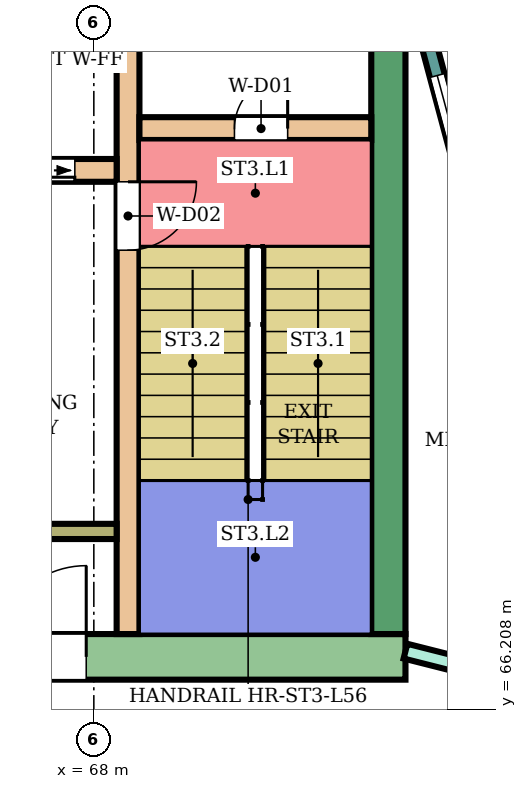
"""IFC4 building model, lengths in metres.
Left out: names, types, materials, properties, quantities, classifications, styles, units other than length and angle.
Written with IfcOpenShell. Run it as: python <this file> out.ifc"""

import sys

from ifc_helpers import new_model, si_unit, direction, frame, frame_2d, origin, place, context, subcontext, project, spatial, rectangle, extrude, element, fill, save


model = new_model("IFC4")
c1 = context("Model", 3, precision=1e-05, world=origin(), true_north=direction((0.0, 1.0)))
c2 = subcontext(c1, "Body", "Model", "MODEL_VIEW")
j1 = project(units=[si_unit("LENGTHUNIT", "METRE"), si_unit("PLANEANGLEUNIT", "RADIAN")], contexts=[c1])
p1 = place(None, origin())
s1 = spatial("IfcSite", under=j1, at=p1, CompositionType="ELEMENT")
p2 = place(p1, origin())
s2 = spatial("IfcBuilding", under=s1, at=p2, CompositionType="ELEMENT")
p3 = place(p2, frame((0.0, 0.0, 245.7)))
s3 = spatial("IfcBuildingStorey", under=s2, at=p3, CompositionType="ELEMENT", Elevation=245.7)
p4 = place(p3, frame((72.1, 66.9, 0.0), z_axis=(0.0, 0.0, 1.0), x_axis=(-1.0, 0.0, 0.0)))
e1 = element("IfcWall", 1, at=p4, inside=s3, PredefinedType="SHEAR", context=c2, shape_type="SweptSolid", body=[
    extrude(rectangle(XDim=14.9, YDim=0.6, at=frame_2d((7.45, 0.0))), origin(), (0.0, 0.0, 1.0), 3.88),
])
p5 = place(p4, frame((4.2, 0.0, 0.0)))
e2 = element("IfcOpeningElement", 2, at=p5, cuts=e1, PredefinedType="OPENING", context=c2, shape_type="SweptSolid", body=[
    extrude(rectangle(XDim=2.4, YDim=2.4, at=frame_2d((1.2, 1.2))), frame((0.0, 0.31, 0.0), z_axis=(0.0, -1.0, 0.0), x_axis=(1.0, 0.0, 0.0)), (0.0, 0.0, 1.0), 0.62),
])
p6 = place(p3, frame((71.875, 75.0, 0.0), z_axis=(0.0, 0.0, 1.0), x_axis=(0.0, -1.0, 0.0)))
e3 = element("IfcWall", 3, at=p6, inside=s3, PredefinedType="SHEAR", context=c2, shape_type="SweptSolid", body=[
    extrude(rectangle(XDim=7.8, YDim=0.45, at=frame_2d((3.9, 0.0))), origin(), (0.0, 0.0, 1.0), 3.88),
])
p7 = place(p3, frame((68.45, 75.0, 0.0), z_axis=(0.0, 0.0, 1.0), x_axis=(0.0, -1.0, 0.0)))
e4 = element("IfcWall", 4, at=p7, inside=s3, PredefinedType="SHEAR", context=c2, shape_type="SweptSolid", body=[
    extrude(rectangle(XDim=7.8, YDim=0.3, at=frame_2d((3.9, 0.0))), origin(), (0.0, 0.0, 1.0), 3.88),
])
p8 = place(p7, frame((1.85, 0.0, 0.0)))
e5 = element("IfcOpeningElement", 5, at=p8, cuts=e4, PredefinedType="OPENING", context=c2, shape_type="SweptSolid", body=[
    extrude(rectangle(XDim=0.9, YDim=2.1, at=frame_2d((0.45, 1.05))), frame((0.0, 0.16, 0.0), z_axis=(0.0, -1.0, 0.0), x_axis=(1.0, 0.0, 0.0)), (0.0, 0.0, 1.0), 0.32),
])
p9 = place(p3, frame((71.65, 73.85, 0.0), z_axis=(0.0, 0.0, 1.0), x_axis=(-1.0, 0.0, 0.0)))
e6 = element("IfcWall", 6, at=p9, inside=s3, PredefinedType="SHEAR", context=c2, shape_type="SweptSolid", body=[
    extrude(rectangle(XDim=3.05, YDim=0.3, at=frame_2d((1.525, 0.0))), origin(), (0.0, 0.0, 1.0), 3.88),
])
p10 = place(p9, frame((1.1, 0.0, 0.0)))
e7 = element("IfcOpeningElement", 7, at=p10, cuts=e6, PredefinedType="OPENING", context=c2, shape_type="SweptSolid", body=[
    extrude(rectangle(XDim=0.7, YDim=2.0, at=frame_2d((0.35, 1.0))), frame((0.0, 0.16, 0.0), z_axis=(0.0, -1.0, 0.0), x_axis=(1.0, 0.0, 0.0)), (0.0, 0.0, 1.0), 0.32),
])
p11 = place(p3, frame((68.3, 73.3, 0.0), z_axis=(0.0, 0.0, 1.0), x_axis=(-1.0, 0.0, 0.0)))
e8 = element("IfcWall", 8, at=p11, inside=s3, PredefinedType="SHEAR", context=c2, shape_type="SweptSolid", body=[
    extrude(rectangle(XDim=11.1, YDim=0.3, at=frame_2d((5.55, 0.0))), origin(), (0.0, 0.0, 1.0), 3.88),
])
p12 = place(p11, frame((0.55, 0.0, 0.0)))
e9 = element("IfcOpeningElement", 9, at=p12, cuts=e8, PredefinedType="OPENING", context=c2, shape_type="SweptSolid", body=[
    extrude(rectangle(XDim=1.1, YDim=2.1, at=frame_2d((0.55, 1.05))), frame((0.0, 0.16, 0.0), z_axis=(0.0, -1.0, 0.0), x_axis=(1.0, 0.0, 0.0)), (0.0, 0.0, 1.0), 0.32),
])
p13 = place(p11, frame((3.0, 0.0, 0.0)))
e10 = element("IfcOpeningElement", 10, at=p13, cuts=e8, PredefinedType="OPENING", context=c2, shape_type="SweptSolid", body=[
    extrude(rectangle(XDim=1.2, YDim=2.1, at=frame_2d((0.6, 1.05))), frame((0.0, 0.16, 0.0), z_axis=(0.0, -1.0, 0.0), x_axis=(1.0, 0.0, 0.0)), (0.0, 0.0, 1.0), 0.32),
])
p14 = place(p11, frame((5.5, 0.0, 0.0)))
e11 = element("IfcOpeningElement", 11, at=p14, cuts=e8, PredefinedType="OPENING", context=c2, shape_type="SweptSolid", body=[
    extrude(rectangle(XDim=1.2, YDim=2.1, at=frame_2d((0.6, 1.05))), frame((0.0, 0.16, 0.0), z_axis=(0.0, -1.0, 0.0), x_axis=(1.0, 0.0, 0.0)), (0.0, 0.0, 1.0), 0.32),
])
p15 = place(p11, frame((7.95, 0.0, 0.0)))
e12 = element("IfcOpeningElement", 12, at=p15, cuts=e8, PredefinedType="OPENING", context=c2, shape_type="SweptSolid", body=[
    extrude(rectangle(XDim=0.9, YDim=2.1, at=frame_2d((0.45, 1.05))), frame((0.0, 0.16, 0.0), z_axis=(0.0, -1.0, 0.0), x_axis=(1.0, 0.0, 0.0)), (0.0, 0.0, 1.0), 0.32),
])
p16 = place(p11, frame((9.75, 0.0, 0.0)))
e13 = element("IfcOpeningElement", 13, at=p16, cuts=e8, PredefinedType="OPENING", context=c2, shape_type="SweptSolid", body=[
    extrude(rectangle(XDim=0.9, YDim=2.1, at=frame_2d((0.45, 1.05))), frame((0.0, 0.16, 0.0), z_axis=(0.0, -1.0, 0.0), x_axis=(1.0, 0.0, 0.0)), (0.0, 0.0, 1.0), 0.32),
])
p17 = place(p3, frame((68.3, 68.55, 0.0), z_axis=(0.0, 0.0, 1.0), x_axis=(-1.0, 0.0, 0.0)))
e14 = element("IfcWall", 14, at=p17, inside=s3, PredefinedType="SHEAR", context=c2, shape_type="SweptSolid", body=[
    extrude(rectangle(XDim=4.35, YDim=0.2, at=frame_2d((2.175, 0.0))), origin(), (0.0, 0.0, 1.0), 3.88),
])
p18 = place(p3, frame((72.396, 75.0, 0.0), z_axis=(0.0, 0.0, 1.0), x_axis=(0.258789828301, -0.965933654434, 0.0)))
e15 = element("IfcWall", 15, at=p18, inside=s3, PredefinedType="NOTDEFINED", context=c2, shape_type="SweptSolid", body=[
    extrude(rectangle(XDim=3.936, YDim=0.2, at=frame_2d((1.968, 0.0))), origin(), (0.0, 0.0, 1.0), 4.2),
])
p19 = place(p18, frame((0.468, 0.0, 0.9)))
e16 = element("IfcOpeningElement", 16, at=p19, cuts=e15, PredefinedType="OPENING", context=c2, shape_type="SweptSolid", body=[
    extrude(rectangle(XDim=3.0, YDim=2.3, at=frame_2d((1.5, 1.15))), frame((0.0, 0.11, 0.0), z_axis=(0.0, -1.0, 0.0), x_axis=(1.0, 0.0, 0.0)), (0.0, 0.0, 1.0), 0.22),
])
p20 = place(p3, frame((72.1, 66.975, 0.0), z_axis=(0.0, 0.0, 1.0), x_axis=(0.969471314457, -0.245204752086, 0.0)))
e17 = element("IfcWall", 17, at=p20, inside=s3, PredefinedType="PARTITIONING", context=c2, shape_type="SweptSolid", body=[
    extrude(rectangle(XDim=2.582, YDim=0.2, at=frame_2d((1.291, 0.0))), origin(), (0.0, 0.0, 1.0), 3.75),
])
p21 = place(p20, frame((0.841, 0.0, 0.0)))
e18 = element("IfcOpeningElement", 18, at=p21, cuts=e17, PredefinedType="OPENING", context=c2, shape_type="SweptSolid", body=[
    extrude(rectangle(XDim=0.9, YDim=2.1, at=frame_2d((0.45, 1.05))), frame((0.0, 0.11, 0.0), z_axis=(0.0, -1.0, 0.0), x_axis=(1.0, 0.0, 0.0)), (0.0, 0.0, 1.0), 0.22),
])
p22 = place(p19, origin())
e19 = element("IfcWindow", 19, at=p22, inside=s3, PartitioningType="SINGLE_PANEL", PredefinedType="WINDOW", context=c2, shape_type="SweptSolid", body=[
    extrude(rectangle(XDim=3.0, YDim=2.3, at=frame_2d((1.5, 1.15))), frame((0.0, 0.03, 0.0), z_axis=(0.0, -1.0, 0.0), x_axis=(1.0, 0.0, 0.0)), (0.0, 0.0, 1.0), 0.06),
])
fill(e16, e19)
p23 = place(p10, frame((0.7, 0.0, 0.0), z_axis=(0.0, 0.0, 1.0), x_axis=(-1.0, 0.0, 0.0)))
e20 = element("IfcDoor", 20, at=p23, inside=s3, OperationType="SINGLE_SWING_RIGHT", PredefinedType="DOOR", context=c2, shape_type="SweptSolid", body=[
    extrude(rectangle(XDim=0.7, YDim=2.0, at=frame_2d((0.35, 1.0))), frame((0.0, 0.025, 0.0), z_axis=(0.0, -1.0, 0.0), x_axis=(1.0, 0.0, 0.0)), (0.0, 0.0, 1.0), 0.05),
])
fill(e7, e20)
p24 = place(p8, origin())
e21 = element("IfcDoor", 21, at=p24, inside=s3, OperationType="SINGLE_SWING_LEFT", PredefinedType="DOOR", context=c2, shape_type="SweptSolid", body=[
    extrude(rectangle(XDim=0.9, YDim=2.1, at=frame_2d((0.45, 1.05))), frame((0.0, 0.025, 0.0), z_axis=(0.0, -1.0, 0.0), x_axis=(1.0, 0.0, 0.0)), (0.0, 0.0, 1.0), 0.05),
])
fill(e5, e21)
p25 = place(p12, origin())
e22 = element("IfcDoor", 22, at=p25, inside=s3, OperationType="DOUBLE_DOOR_SLIDING", PredefinedType="DOOR", context=c2, shape_type="SweptSolid", body=[
    extrude(rectangle(XDim=1.1, YDim=2.1, at=frame_2d((0.55, 1.05))), frame((0.0, 0.025, 0.0), z_axis=(0.0, -1.0, 0.0), x_axis=(1.0, 0.0, 0.0)), (0.0, 0.0, 1.0), 0.05),
])
fill(e9, e22)
p26 = place(p5, frame((2.4, 0.0, 0.0), z_axis=(0.0, 0.0, 1.0), x_axis=(-1.0, 0.0, 0.0)))
e23 = element("IfcDoor", 23, at=p26, inside=s3, OperationType="DOUBLE_DOOR_SINGLE_SWING", PredefinedType="DOOR", context=c2, shape_type="SweptSolid", body=[
    extrude(rectangle(XDim=2.4, YDim=2.4, at=frame_2d((1.2, 1.2))), frame((0.0, 0.025, 0.0), z_axis=(0.0, -1.0, 0.0), x_axis=(1.0, 0.0, 0.0)), (0.0, 0.0, 1.0), 0.05),
])
fill(e2, e23)
save(model, sys.argv[1])
